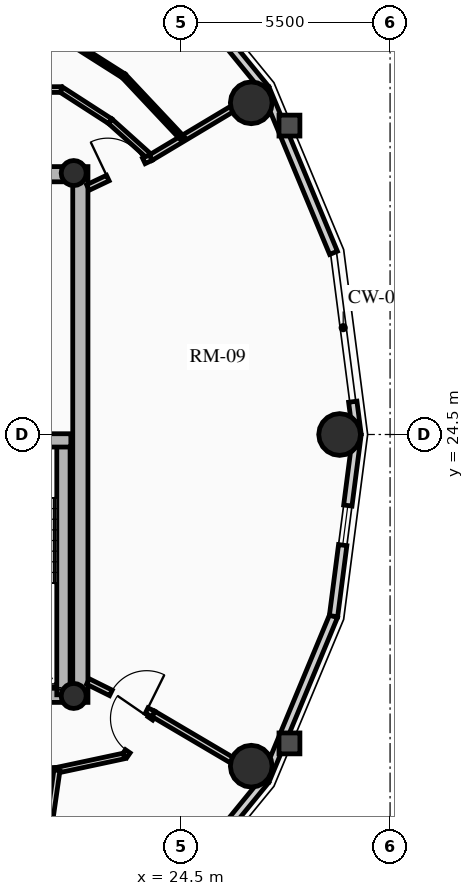
"""IFC4 building model, lengths in metres.
Left out: names, types, materials, properties, quantities, classifications, styles, units other than length and angle.
Written with IfcOpenShell. Run it as: python <this file> out.ifc"""

import sys

from ifc_helpers import new_model, si_unit, direction, frame, frame_2d, origin, origin_2d, place, context, subcontext, project, spatial, rectangle, circle, hollow_circle, extrude, source, transform, mapped, element, fill, save


model = new_model("IFC4")
c1 = context("Model", 3, precision=1e-05, world=origin(), true_north=direction((0.0, 1.0)))
c2 = subcontext(c1, "Body", "Model", "MODEL_VIEW")
j1 = project(units=[si_unit("LENGTHUNIT", "METRE"), si_unit("PLANEANGLEUNIT", "RADIAN")], contexts=[c1])
p1 = place(None, origin())
s1 = spatial("IfcSite", under=j1, at=p1, CompositionType="ELEMENT")
p2 = place(p1, origin())
s2 = spatial("IfcBuilding", under=s1, at=p2, CompositionType="ELEMENT")
p3 = place(p2, frame((0.0, 0.0, 217.03)))
s3 = spatial("IfcBuildingStorey", under=s2, at=p3, CompositionType="ELEMENT", Elevation=217.03)
p4 = place(p3, frame((21.85, 17.45, 0.0), z_axis=(0.0, 0.0, 1.0), x_axis=(0.0, 1.0, 0.0)))
e1 = element("IfcWall", 1, at=p4, inside=s3, PredefinedType="SHEAR", context=c2, shape_type="SweptSolid", body=[
    extrude(rectangle(XDim=14.1, YDim=0.4, at=frame_2d((7.05, 0.0))), origin(), (0.0, 0.0, 1.0), 2.91),
])
p5 = place(p3, frame((11.15, 17.65, 0.0), z_axis=(0.0, 0.0, 1.0), x_axis=(1.0, 0.0, 0.0)))
e2 = element("IfcWall", 2, at=p5, inside=s3, PredefinedType="SHEAR", context=c2, shape_type="SweptSolid", body=[
    extrude(rectangle(XDim=10.7, YDim=0.4, at=frame_2d((5.35, 0.0))), origin(), (0.0, 0.0, 1.0), 2.91),
])
m1 = source(origin(), c2, "Body", "SweptSolid", [
    extrude(rectangle(XDim=1.5, YDim=2.02, at=frame_2d((0.75, 1.01))), frame((0.0, 0.21, 0.0), z_axis=(0.0, -1.0, 0.0), x_axis=(1.0, 0.0, 0.0)), (0.0, 0.0, 1.0), 0.42),
])
p6 = place(p5, frame((5.45, 0.0, 0.0)))
e3 = element("IfcOpeningElement", 3, at=p6, cuts=e2, PredefinedType="OPENING", context=c2, shape_type="MappedRepresentation", body=[
    mapped(m1, transform((0.0, 0.0, 0.0), x_axis=(1.0, 0.0, 0.0), y_axis=(0.0, 1.0, 0.0), z_axis=(0.0, 0.0, 1.0), scale=1.0)),
])
p7 = place(p3, frame((11.15, 31.35, 0.0), z_axis=(0.0, 0.0, 1.0), x_axis=(1.0, 0.0, 0.0)))
e4 = element("IfcWall", 4, at=p7, inside=s3, PredefinedType="SHEAR", context=c2, shape_type="SweptSolid", body=[
    extrude(rectangle(XDim=10.7, YDim=0.4, at=frame_2d((5.35, 0.0))), origin(), (0.0, 0.0, 1.0), 2.91),
])
p8 = place(p7, frame((4.6, 0.0, 0.0)))
e5 = element("IfcOpeningElement", 5, at=p8, cuts=e4, PredefinedType="OPENING", context=c2, shape_type="MappedRepresentation", body=[
    mapped(m1, transform((0.0, 0.0, 0.0), x_axis=(1.0, 0.0, 0.0), y_axis=(0.0, 1.0, 0.0), z_axis=(0.0, 0.0, 1.0), scale=1.0)),
])
p9 = place(p3, frame((21.405, 17.65, 0.0), z_axis=(0.0, 0.0, 1.0), x_axis=(0.0, 1.0, 0.0)))
e6 = element("IfcWall", 6, at=p9, inside=s3, PredefinedType="SHEAR", context=c2, shape_type="SweptSolid", body=[
    extrude(rectangle(XDim=6.695, YDim=0.35, at=frame_2d((3.348, 0.0))), origin(), (0.0, 0.0, 1.0), 2.91),
])
p10 = place(p3, frame((18.315, 24.345, 0.0), z_axis=(0.0, 0.0, 1.0), x_axis=(1.0, 0.0, 0.0)))
e7 = element("IfcWall", 7, at=p10, inside=s3, PredefinedType="SHEAR", context=c2, shape_type="SweptSolid", body=[
    extrude(rectangle(XDim=3.285, YDim=0.35, at=frame_2d((1.643, 0.0))), origin(), (0.0, 0.0, 1.0), 2.91),
])
for number, where, z_axis, x_axis in (
    (8, (21.675, 17.62, 0.0), (0.0, 0.0, 1.0), (1.0, 0.0, 0.0)),
    (9, (21.675, 31.38, 0.0), (0.0, 0.0, 1.0), (1.0, 0.0, 0.0)),
):
    element("IfcColumn", number, at=place(p3, frame(where, z_axis=z_axis, x_axis=x_axis)), inside=s3, PredefinedType="COLUMN", context=c2, shape_type="SweptSolid", body=[
        extrude(hollow_circle(Radius=0.33, WallThickness=0.025, at=origin_2d()), origin(), (0.0, 0.0, 1.0), 2.91),
    ])
for number, where, z_axis, x_axis in (
    (10, (28.672, 24.5, 0.0), (0.0, 0.0, 1.0), (1.0, 0.0, 0.0)),
    (11, (26.347, 33.229, 0.0), (0.0, 0.0, 1.0), (1.0, 0.0, 0.0)),
    (12, (26.347, 15.771, 0.0), (0.0, 0.0, 1.0), (1.0, 0.0, 0.0)),
):
    element("IfcColumn", number, at=place(p3, frame(where, z_axis=z_axis, x_axis=x_axis)), inside=s3, PredefinedType="USERDEFINED", context=c2, shape_type="SweptSolid", body=[
        extrude(circle(Radius=0.55, at=origin_2d()), origin(), (0.0, 0.0, 1.0), 2.91),
    ])
p11 = place(p3, frame((29.018, 25.363, 0.0), z_axis=(0.0, 0.0, 1.0), x_axis=(0.128247365719, -0.991742211054, 0.0)))
e13 = element("IfcWall", 13, at=p11, inside=s3, PredefinedType="SOLIDWALL", context=c2, shape_type="SweptSolid", body=[
    extrude(rectangle(XDim=0.87, YDim=0.22, at=frame_2d((0.435, 0.0))), origin(), (0.0, 0.0, 1.0), 2.322),
])
p12 = place(p3, frame((26.718, 33.593, 0.0), z_axis=(0.0, 0.0, 1.0), x_axis=(0.384036305194, -0.923317993052, 0.0)))
e14 = element("IfcWall", 14, at=p12, inside=s3, PredefinedType="SOLIDWALL", context=c2, shape_type="SweptSolid", body=[
    extrude(rectangle(XDim=4.671, YDim=0.22, at=frame_2d((2.335, 0.0))), origin(), (0.0, 0.0, 1.0), 2.322),
])
p13 = place(p3, frame((23.924, 37.015, 0.0), z_axis=(0.0, 0.0, 1.0), x_axis=(0.632467166636, -0.774587169483, 0.0)))
e15 = element("IfcWall", 15, at=p13, inside=s3, PredefinedType="SOLIDWALL", context=c2, shape_type="SweptSolid", body=[
    extrude(rectangle(XDim=4.418, YDim=0.22, at=frame_2d((2.209, 0.0))), origin(), (0.0, 0.0, 1.0), 2.322),
])
m2 = source(origin(), c2, "Body", "SweptSolid", [
    extrude(rectangle(XDim=1.05, YDim=1.3, at=frame_2d((0.525, 0.65))), frame((0.0, 0.12, 0.0), z_axis=(0.0, -1.0, 0.0), x_axis=(1.0, 0.0, 0.0)), (0.0, 0.0, 1.0), 0.24),
])
p14 = place(p13, frame((1.684, 0.0, 0.65)))
e16 = element("IfcOpeningElement", 16, at=p14, cuts=e15, PredefinedType="OPENING", context=c2, shape_type="MappedRepresentation", body=[
    mapped(m2, transform((0.0, 0.0, 0.0), x_axis=(1.0, 0.0, 0.0), y_axis=(0.0, 1.0, 0.0), z_axis=(0.0, 0.0, 1.0), scale=1.0)),
])
p15 = place(p3, frame((26.718, 15.407, 0.0), z_axis=(0.0, 0.0, 1.0), x_axis=(-0.632467166636, -0.774587169483, 0.0)))
e17 = element("IfcWall", 17, at=p15, inside=s3, PredefinedType="SOLIDWALL", context=c2, shape_type="SweptSolid", body=[
    extrude(rectangle(XDim=4.418, YDim=0.22, at=frame_2d((2.209, 0.0))), origin(), (0.0, 0.0, 1.0), 2.322),
])
p16 = place(p15, frame((1.684, 0.0, 0.65)))
e18 = element("IfcOpeningElement", 18, at=p16, cuts=e17, PredefinedType="OPENING", context=c2, shape_type="MappedRepresentation", body=[
    mapped(m2, transform((0.0, 0.0, 0.0), x_axis=(1.0, 0.0, 0.0), y_axis=(0.0, 1.0, 0.0), z_axis=(0.0, 0.0, 1.0), scale=1.0)),
])
p17 = place(p3, frame((28.512, 19.719, 0.0), z_axis=(0.0, 0.0, 1.0), x_axis=(-0.384036305194, -0.923317993052, 0.0)))
e19 = element("IfcWall", 19, at=p17, inside=s3, PredefinedType="SOLIDWALL", context=c2, shape_type="SweptSolid", body=[
    extrude(rectangle(XDim=4.671, YDim=0.22, at=frame_2d((2.335, 0.0))), origin(), (0.0, 0.0, 1.0), 2.322),
])
p18 = place(p3, frame((29.13, 24.5, 0.0), z_axis=(0.0, 0.0, 1.0), x_axis=(-0.128241318541, -0.991742993027, 0.0)))
e20 = element("IfcWall", 20, at=p18, inside=s3, PredefinedType="SOLIDWALL", context=c2, shape_type="SweptSolid", body=[
    extrude(rectangle(XDim=4.82, YDim=0.22, at=frame_2d((2.41, 0.0))), origin(), (0.0, 0.0, 1.0), 2.322),
])
p19 = place(p18, frame((1.885, 0.0, 0.65)))
e21 = element("IfcOpeningElement", 21, at=p19, cuts=e20, PredefinedType="OPENING", context=c2, shape_type="MappedRepresentation", body=[
    mapped(m2, transform((0.0, 0.0, 0.0), x_axis=(1.0, 0.0, 0.0), y_axis=(0.0, 1.0, 0.0), z_axis=(0.0, 0.0, 1.0), scale=1.0)),
])
p20 = place(p3, frame((23.701, 31.786, 0.0), z_axis=(0.0, 0.0, 1.0), x_axis=(-0.743742806382, 0.668465883913, 0.0)))
e22 = element("IfcWall", 22, at=p20, inside=s3, PredefinedType="PARTITIONING", context=c2, shape_type="SweptSolid", body=[
    extrude(rectangle(XDim=1.434, YDim=0.15, at=frame_2d((0.717, 0.0))), origin(), (0.0, 0.0, 1.0), 2.322),
])
p21 = place(p3, frame((22.635, 32.744, 0.0), z_axis=(0.0, 0.0, 1.0), x_axis=(-0.840119270642, 0.542401706391, 0.0)))
e23 = element("IfcWall", 23, at=p21, inside=s3, PredefinedType="PARTITIONING", context=c2, shape_type="SweptSolid", body=[
    extrude(rectangle(XDim=1.538, YDim=0.15, at=frame_2d((0.769, 0.0))), origin(), (0.0, 0.0, 1.0), 2.255),
])
p22 = place(p3, frame((21.344, 33.578, 0.0), z_axis=(0.0, 0.0, 1.0), x_axis=(-0.999984243152, -0.005613684, 0.0)))
e24 = element("IfcWall", 24, at=p22, inside=s3, PredefinedType="PARTITIONING", context=c2, shape_type="SweptSolid", body=[
    extrude(rectangle(XDim=3.262, YDim=0.15, at=frame_2d((1.631, 0.0))), origin(), (0.0, 0.0, 1.0), 2.322),
])
m3 = source(origin(), c2, "Body", "SweptSolid", [
    extrude(rectangle(XDim=1.05, YDim=2.015, at=frame_2d((0.525, 1.007))), frame((0.0, 0.085, 0.0), z_axis=(0.0, -1.0, 0.0), x_axis=(1.0, 0.0, 0.0)), (0.0, 0.0, 1.0), 0.17),
])
p23 = place(p22, frame((1.599, 0.0, 0.0)))
e25 = element("IfcOpeningElement", 25, at=p23, cuts=e24, PredefinedType="OPENING", context=c2, shape_type="MappedRepresentation", body=[
    mapped(m3, transform((0.0, 0.0, 0.0), x_axis=(1.0, 0.0, 0.0), y_axis=(0.0, 1.0, 0.0), z_axis=(0.0, 0.0, 1.0), scale=1.0)),
])
p24 = place(p3, frame((14.845, 15.441, 0.0), z_axis=(0.0, 0.0, 1.0), x_axis=(0.99938794868, 0.034981824334, 0.0)))
e26 = element("IfcWall", 26, at=p24, inside=s3, PredefinedType="PARTITIONING", context=c2, shape_type="SweptSolid", body=[
    extrude(rectangle(XDim=6.393, YDim=0.15, at=frame_2d((3.196, 0.0))), origin(), (0.0, 0.0, 1.0), 2.255),
])
p25 = place(p3, frame((21.234, 15.664, 0.0), z_axis=(0.0, 0.0, 1.0), x_axis=(0.977931581182, 0.208925399431, 0.0)))
e27 = element("IfcWall", 27, at=p25, inside=s3, PredefinedType="PARTITIONING", context=c2, shape_type="SweptSolid", body=[
    extrude(rectangle(XDim=1.823, YDim=0.15, at=frame_2d((0.912, 0.0))), origin(), (0.0, 0.0, 1.0), 2.255),
])
p26 = place(p3, frame((23.017, 16.045, 0.0), z_axis=(0.0, 0.0, 1.0), x_axis=(0.566660656138, 0.823951273308, 0.0)))
e28 = element("IfcWall", 28, at=p26, inside=s3, PredefinedType="PARTITIONING", context=c2, shape_type="SweptSolid", body=[
    extrude(rectangle(XDim=1.336, YDim=0.15, at=frame_2d((0.668, 0.0))), origin(), (0.0, 0.0, 1.0), 2.322),
])
p27 = place(p26, frame((0.143, 0.0, 0.0)))
e29 = element("IfcOpeningElement", 29, at=p27, cuts=e28, PredefinedType="OPENING", context=c2, shape_type="MappedRepresentation", body=[
    mapped(m3, transform((0.0, 0.0, 0.0), x_axis=(1.0, 0.0, 0.0), y_axis=(0.0, 1.0, 0.0), z_axis=(0.0, 0.0, 1.0), scale=1.0)),
])
p28 = place(p3, frame((23.701, 31.786, 0.0), z_axis=(0.0, 0.0, 1.0), x_axis=(0.858059206709, 0.513550774298, 0.0)))
e30 = element("IfcWall", 30, at=p28, inside=s3, PredefinedType="PARTITIONING", context=c2, shape_type="SweptSolid", body=[
    extrude(rectangle(XDim=3.497, YDim=0.16, at=frame_2d((1.748, 0.0))), origin(), (0.0, 0.0, 1.0), 2.322),
])
p29 = place(p3, frame((21.234, 15.664, 0.0), z_axis=(0.0, 0.0, 1.0), x_axis=(-0.141467563045, -0.989942891588, 0.0)))
e31 = element("IfcWall", 31, at=p29, inside=s3, PredefinedType="PARTITIONING", context=c2, shape_type="SweptSolid", body=[
    extrude(rectangle(XDim=5.918, YDim=0.16, at=frame_2d((2.959, 0.0))), origin(), (0.0, 0.0, 1.0), 2.322),
])
p30 = place(p3, frame((23.774, 17.146, 0.0), z_axis=(0.0, 0.0, 1.0), x_axis=(0.861296601099, -0.508102514198, 0.0)))
e32 = element("IfcWall", 32, at=p30, inside=s3, PredefinedType="PARTITIONING", context=c2, shape_type="SweptSolid", body=[
    extrude(rectangle(XDim=3.399, YDim=0.16, at=frame_2d((1.7, 0.0))), origin(), (0.0, 0.0, 1.0), 2.322),
])
p31 = place(p3, frame((22.05, 31.0, 0.0), z_axis=(0.0, 0.0, 1.0), x_axis=(0.903013459407, 0.429612257891, 0.0)))
e33 = element("IfcWall", 33, at=p31, inside=s3, PredefinedType="PARTITIONING", context=c2, shape_type="SweptSolid", body=[
    extrude(rectangle(XDim=1.829, YDim=0.16, at=frame_2d((0.914, 0.0))), origin(), (0.0, 0.0, 1.0), 2.255),
])
m4 = source(origin(), c2, "Body", "SweptSolid", [
    extrude(rectangle(XDim=1.05, YDim=2.015, at=frame_2d((0.525, 1.007))), frame((0.0, 0.09, 0.0), z_axis=(0.0, -1.0, 0.0), x_axis=(1.0, 0.0, 0.0)), (0.0, 0.0, 1.0), 0.18),
])
p32 = place(p31, frame((0.579, 0.0, 0.0)))
e34 = element("IfcOpeningElement", 34, at=p32, cuts=e33, PredefinedType="OPENING", context=c2, shape_type="MappedRepresentation", body=[
    mapped(m4, transform((0.0, 0.0, 0.0), x_axis=(1.0, 0.0, 0.0), y_axis=(0.0, 1.0, 0.0), z_axis=(0.0, 0.0, 1.0), scale=1.0)),
])
p33 = place(p3, frame((22.05, 18.0, 0.0), z_axis=(0.0, 0.0, 1.0), x_axis=(0.896045848613, -0.443961526692, 0.0)))
e35 = element("IfcWall", 35, at=p33, inside=s3, PredefinedType="PARTITIONING", context=c2, shape_type="SweptSolid", body=[
    extrude(rectangle(XDim=1.924, YDim=0.16, at=frame_2d((0.962, 0.0))), origin(), (0.0, 0.0, 1.0), 2.255),
])
p34 = place(p33, frame((0.674, 0.0, 0.0)))
e36 = element("IfcOpeningElement", 36, at=p34, cuts=e35, PredefinedType="OPENING", context=c2, shape_type="MappedRepresentation", body=[
    mapped(m4, transform((0.0, 0.0, 0.0), x_axis=(1.0, 0.0, 0.0), y_axis=(0.0, 1.0, 0.0), z_axis=(0.0, 0.0, 1.0), scale=1.0)),
])
p35 = place(p3, frame((24.542, 32.288, 0.0), z_axis=(0.0, 0.0, 1.0), x_axis=(-0.68501091047, 0.72853280814, 0.0)))
e37 = element("IfcWall", 37, at=p35, inside=s3, PredefinedType="PARTITIONING", context=c2, shape_type="SweptSolid", body=[
    extrude(rectangle(XDim=2.261, YDim=0.125, at=frame_2d((1.13, 0.0))), origin(), (0.0, 0.0, 1.0), 2.322),
])
p36 = place(p3, frame((22.993, 33.935, 0.0), z_axis=(0.0, 0.0, 1.0), x_axis=(-0.844312558894, 0.535851008112, 0.0)))
e38 = element("IfcWall", 38, at=p36, inside=s3, PredefinedType="PARTITIONING", context=c2, shape_type="SweptSolid", body=[
    extrude(rectangle(XDim=2.268, YDim=0.125, at=frame_2d((1.134, 0.0))), origin(), (0.0, 0.0, 1.0), 2.255),
])
m5 = source(origin(), c2, "Body", "SweptSolid", [
    extrude(rectangle(XDim=1.05, YDim=1.3, at=frame_2d((0.525, 0.65))), frame((0.0, 0.03, 0.0), z_axis=(0.0, -1.0, 0.0), x_axis=(1.0, 0.0, 0.0)), (0.0, 0.0, 1.0), 0.06),
])
p37 = place(p19, origin())
e39 = element("IfcWindow", 39, at=p37, inside=s3, PartitioningType="SINGLE_PANEL", PredefinedType="WINDOW", context=c2, shape_type="MappedRepresentation", body=[
    mapped(m5, transform((0.0, 0.0, 0.0), x_axis=(1.0, 0.0, 0.0), y_axis=(0.0, 1.0, 0.0), z_axis=(0.0, 0.0, 1.0), scale=1.0)),
])
fill(e21, e39)
m6 = source(origin(), c2, "Body", "SweptSolid", [
    extrude(rectangle(XDim=1.05, YDim=2.015, at=frame_2d((0.525, 1.007))), frame((0.0, 0.025, 0.0), z_axis=(0.0, -1.0, 0.0), x_axis=(1.0, 0.0, 0.0)), (0.0, 0.0, 1.0), 0.05),
])
p38 = place(p32, origin())
e40 = element("IfcDoor", 40, at=p38, inside=s3, OperationType="SINGLE_SWING_LEFT", PredefinedType="DOOR", context=c2, shape_type="MappedRepresentation", body=[
    mapped(m6, transform((0.0, 0.0, 0.0), x_axis=(1.0, 0.0, 0.0), y_axis=(0.0, 1.0, 0.0), z_axis=(0.0, 0.0, 1.0), scale=1.0)),
])
fill(e34, e40)
p39 = place(p34, origin())
e41 = element("IfcDoor", 41, at=p39, inside=s3, OperationType="SINGLE_SWING_RIGHT", PredefinedType="DOOR", context=c2, shape_type="MappedRepresentation", body=[
    mapped(m6, transform((0.0, 0.0, 0.0), x_axis=(1.0, 0.0, 0.0), y_axis=(0.0, 1.0, 0.0), z_axis=(0.0, 0.0, 1.0), scale=1.0)),
])
fill(e36, e41)
p40 = place(p27, origin())
e42 = element("IfcDoor", 42, at=p40, inside=s3, OperationType="SINGLE_SWING_RIGHT", PredefinedType="DOOR", context=c2, shape_type="MappedRepresentation", body=[
    mapped(m6, transform((0.0, 0.0, 0.0), x_axis=(1.0, 0.0, 0.0), y_axis=(0.0, 1.0, 0.0), z_axis=(0.0, 0.0, 1.0), scale=1.0)),
])
fill(e29, e42)
save(model, sys.argv[1])
